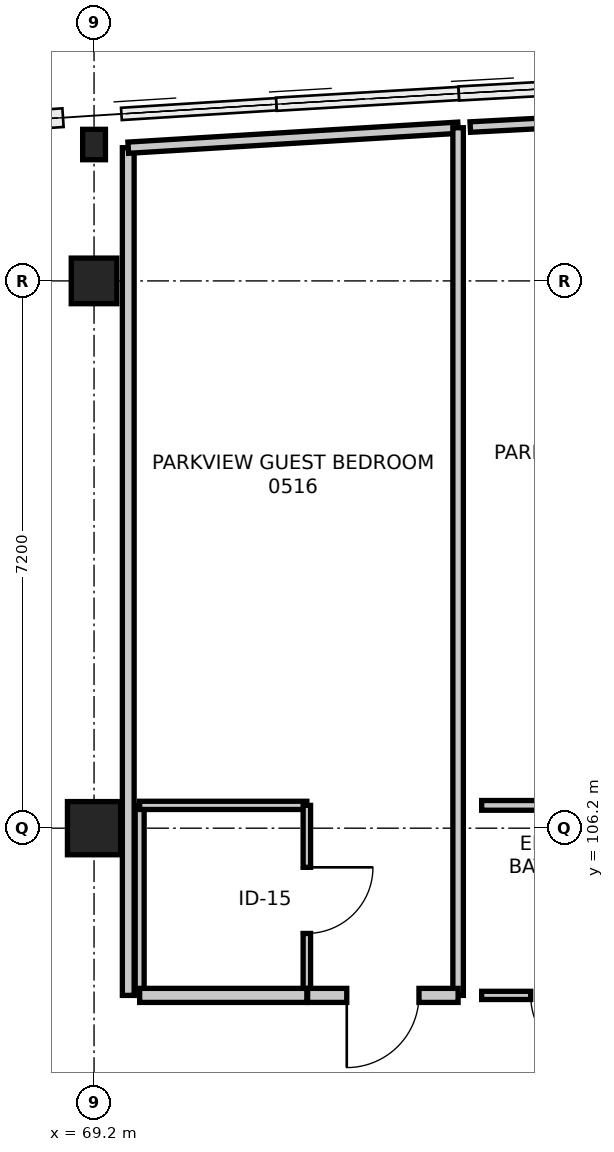
"""IFC4 building model, lengths in metres.
Left out: names, types, materials, properties, quantities, classifications, styles, units other than length and angle.
Written with IfcOpenShell. Run it as: python <this file> out.ifc"""

import sys

from ifc_helpers import new_model, si_unit, direction, frame, frame_2d, origin, origin_2d, place, context, subcontext, project, spatial, rectangle, i_section, extrude, element, fill, save


model = new_model("IFC4")
c1 = context("Model", 3, precision=1e-05, world=origin(), true_north=direction((0.0, 1.0)))
c2 = subcontext(c1, "Body", "Model", "MODEL_VIEW")
j1 = project(units=[si_unit("LENGTHUNIT", "METRE"), si_unit("PLANEANGLEUNIT", "RADIAN")], contexts=[c1])
p1 = place(None, origin())
s1 = spatial("IfcSite", under=j1, at=p1, CompositionType="ELEMENT")
p2 = place(p1, origin())
s2 = spatial("IfcBuilding", under=s1, at=p2, CompositionType="ELEMENT")
p3 = place(p2, frame((0.0, 0.0, 22.8)))
s3 = spatial("IfcBuildingStorey", under=s2, at=p3, CompositionType="ELEMENT", Elevation=22.8)
p4 = place(p3, frame((69.2, 106.2, 0.0), z_axis=(0.0, 0.0, 1.0), x_axis=(1.0, 0.0, 0.0)))
e1 = element("IfcColumn", 1, at=p4, inside=s3, PredefinedType="COLUMN", context=c2, shape_type="SweptSolid", body=[
    extrude(rectangle(XDim=0.7, YDim=0.7, at=origin_2d()), origin(), (0.0, 0.0, 1.0), 3.6),
])
p5 = place(p3, frame((69.2, 113.4, 0.0), z_axis=(0.0, 0.0, 1.0), x_axis=(1.0, 0.0, 0.0)))
e2 = element("IfcColumn", 2, at=p5, inside=s3, PredefinedType="COLUMN", context=c2, shape_type="SweptSolid", body=[
    extrude(rectangle(XDim=0.6, YDim=0.6, at=origin_2d()), origin(), (0.0, 0.0, 1.0), 3.6),
])
p6 = place(p3, frame((69.2, 115.194, 0.0), z_axis=(0.0, 0.0, 1.0), x_axis=(1.0, 0.0, 0.0)))
e3 = element("IfcColumn", 3, at=p6, inside=s3, PredefinedType="COLUMN", context=c2, shape_type="SweptSolid", body=[
    extrude(i_section(OverallWidth=0.3, OverallDepth=0.4, WebThickness=0.013, FlangeThickness=0.024, FilletRadius=0.027, at=origin_2d()), origin(), (0.0, 0.0, 1.0), 3.6),
])
p7 = place(p3, frame((69.8, 104.0, 0.0), z_axis=(0.0, 0.0, 1.0), x_axis=(0.0, 1.0, 0.0)))
e4 = element("IfcWall", 4, at=p7, inside=s3, PredefinedType="PARTITIONING", context=c2, shape_type="SweptSolid", body=[
    extrude(rectangle(XDim=2.5, YDim=0.118, at=frame_2d((1.25, 0.0))), origin(), (0.0, 0.0, 1.0), 2.735),
])
p8 = place(p3, frame((69.8, 106.5, 0.0), z_axis=(0.0, 0.0, 1.0), x_axis=(1.0, 0.0, 0.0)))
e5 = element("IfcWall", 5, at=p8, inside=s3, PredefinedType="PARTITIONING", context=c2, shape_type="SweptSolid", body=[
    extrude(rectangle(XDim=2.2, YDim=0.108, at=frame_2d((1.1, 0.0))), origin(), (0.0, 0.0, 1.0), 3.35),
])
p9 = place(p3, frame((72.0, 106.5, 0.0), z_axis=(0.0, 0.0, 1.0), x_axis=(0.0, -1.0, 0.0)))
e6 = element("IfcWall", 6, at=p9, inside=s3, PredefinedType="PARTITIONING", context=c2, shape_type="SweptSolid", body=[
    extrude(rectangle(XDim=2.5, YDim=0.098, at=frame_2d((1.25, 0.0))), origin(), (0.0, 0.0, 1.0), 2.735),
])
p10 = place(p9, frame((0.815, 0.0, 0.0)))
e7 = element("IfcOpeningElement", 7, at=p10, cuts=e6, PredefinedType="OPENING", context=c2, shape_type="SweptSolid", body=[
    extrude(rectangle(XDim=0.87, YDim=2.07, at=frame_2d((0.435, 1.035))), frame((0.0, 0.059, 0.0), z_axis=(0.0, -1.0, 0.0), x_axis=(1.0, 0.0, 0.0)), (0.0, 0.0, 1.0), 0.118),
])
p11 = place(p3, frame((72.0, 104.0, 0.0), z_axis=(0.0, 0.0, 1.0), x_axis=(-1.0, 0.0, 0.0)))
e8 = element("IfcWall", 8, at=p11, inside=s3, PredefinedType="PARTITIONING", context=c2, shape_type="SweptSolid", body=[
    extrude(rectangle(XDim=2.2, YDim=0.185, at=frame_2d((1.1, 0.0))), origin(), (0.0, 0.0, 1.0), 3.35),
])
p12 = place(p3, frame((69.65, 104.0, 0.0), z_axis=(0.0, 0.0, 1.0), x_axis=(0.0, 1.0, 0.0)))
e9 = element("IfcWall", 9, at=p12, inside=s3, PredefinedType="PARTITIONING", context=c2, shape_type="SweptSolid", body=[
    extrude(rectangle(XDim=11.152, YDim=0.155, at=frame_2d((5.576, 0.0))), origin(), (0.0, 0.0, 1.0), 2.735),
])
p13 = place(p3, frame((69.65, 115.152, 0.0), z_axis=(0.0, 0.0, 1.0), x_axis=(0.998169832058, 0.060473021833, 0.0)))
e10 = element("IfcWall", 10, at=p13, inside=s3, PredefinedType="PARTITIONING", context=c2, shape_type="SweptSolid", body=[
    extrude(rectangle(XDim=4.348, YDim=0.148, at=frame_2d((2.174, 0.0))), origin(), (0.0, 0.0, 1.0), 2.926),
])
p14 = place(p3, frame((73.99, 115.415, 0.0), z_axis=(0.0, 0.0, 1.0), x_axis=(0.0, -1.0, 0.0)))
e11 = element("IfcWall", 11, at=p14, inside=s3, PredefinedType="PARTITIONING", context=c2, shape_type="SweptSolid", body=[
    extrude(rectangle(XDim=11.415, YDim=0.138, at=frame_2d((5.708, 0.0))), origin(), (0.0, 0.0, 1.0), 2.735),
])
p15 = place(p3, frame((73.99, 104.0, 0.0), z_axis=(0.0, 0.0, 1.0), x_axis=(-1.0, 0.0, 0.0)))
e12 = element("IfcWall", 12, at=p15, inside=s3, PredefinedType="PARTITIONING", context=c2, shape_type="SweptSolid", body=[
    extrude(rectangle(XDim=1.98, YDim=0.185, at=frame_2d((0.99, 0.0))), origin(), (0.0, 0.0, 1.0), 3.35),
])
p16 = place(p15, frame((0.515, 0.0, 0.0)))
e13 = element("IfcOpeningElement", 13, at=p16, cuts=e12, PredefinedType="OPENING", context=c2, shape_type="SweptSolid", body=[
    extrude(rectangle(XDim=0.95, YDim=2.1, at=frame_2d((0.475, 1.05))), frame((0.0, 0.103, 0.0), z_axis=(0.0, -1.0, 0.0), x_axis=(1.0, 0.0, 0.0)), (0.0, 0.0, 1.0), 0.205),
])
p17 = place(p3, frame((74.3, 106.5, 0.0), z_axis=(0.0, 0.0, 1.0), x_axis=(1.0, 0.0, 0.0)))
e14 = element("IfcWall", 14, at=p17, inside=s3, PredefinedType="PARTITIONING", context=c2, shape_type="SweptSolid", body=[
    extrude(rectangle(XDim=1.79, YDim=0.128, at=frame_2d((0.895, 0.0))), origin(), (0.0, 0.0, 1.0), 3.35),
])
p18 = place(p3, frame((76.5, 104.0, 0.0), z_axis=(0.0, 0.0, 1.0), x_axis=(-1.0, 0.0, 0.0)))
e15 = element("IfcWall", 15, at=p18, inside=s3, PredefinedType="PARTITIONING", context=c2, shape_type="SweptSolid", body=[
    extrude(rectangle(XDim=2.2, YDim=0.108, at=frame_2d((1.1, 0.0))), origin(), (0.0, 0.0, 1.0), 2.685),
])
p19 = place(p18, frame((0.645, 0.0, 0.0)))
e16 = element("IfcOpeningElement", 16, at=p19, cuts=e15, PredefinedType="OPENING", context=c2, shape_type="SweptSolid", body=[
    extrude(rectangle(XDim=0.91, YDim=2.11, at=frame_2d((0.455, 1.055))), frame((0.0, 0.064, 0.0), z_axis=(0.0, -1.0, 0.0), x_axis=(1.0, 0.0, 0.0)), (0.0, 0.0, 1.0), 0.128),
])
p20 = place(p3, frame((74.15, 115.424, 0.0), z_axis=(0.0, 0.0, 1.0), x_axis=(0.998613791759, 0.052635490965, 0.0)))
e17 = element("IfcWall", 17, at=p20, inside=s3, PredefinedType="PARTITIONING", context=c2, shape_type="SweptSolid", body=[
    extrude(rectangle(XDim=4.346, YDim=0.138, at=frame_2d((2.173, 0.0))), origin(), (0.0, 0.0, 1.0), 2.926),
])
p21 = place(p10, origin())
e18 = element("IfcDoor", 18, at=p21, inside=s3, OperationType="SINGLE_SWING_LEFT", PredefinedType="DOOR", context=c2, shape_type="SweptSolid", body=[
    extrude(rectangle(XDim=0.87, YDim=2.07, at=frame_2d((0.435, 1.035))), frame((0.0, 0.025, 0.0), z_axis=(0.0, -1.0, 0.0), x_axis=(1.0, 0.0, 0.0)), (0.0, 0.0, 1.0), 0.05),
])
fill(e7, e18)
p22 = place(p16, origin())
e19 = element("IfcDoor", 19, at=p22, inside=s3, OperationType="SINGLE_SWING_RIGHT", PredefinedType="DOOR", context=c2, shape_type="SweptSolid", body=[
    extrude(rectangle(XDim=0.95, YDim=2.1, at=frame_2d((0.475, 1.05))), frame((0.0, 0.025, 0.0), z_axis=(0.0, -1.0, 0.0), x_axis=(1.0, 0.0, 0.0)), (0.0, 0.0, 1.0), 0.05),
])
fill(e13, e19)
p23 = place(p19, origin())
e20 = element("IfcDoor", 20, at=p23, inside=s3, OperationType="SINGLE_SWING_LEFT", PredefinedType="DOOR", context=c2, shape_type="SweptSolid", body=[
    extrude(rectangle(XDim=0.91, YDim=2.11, at=frame_2d((0.455, 1.055))), frame((0.0, 0.025, 0.0), z_axis=(0.0, -1.0, 0.0), x_axis=(1.0, 0.0, 0.0)), (0.0, 0.0, 1.0), 0.05),
])
fill(e16, e20)
save(model, sys.argv[1])
